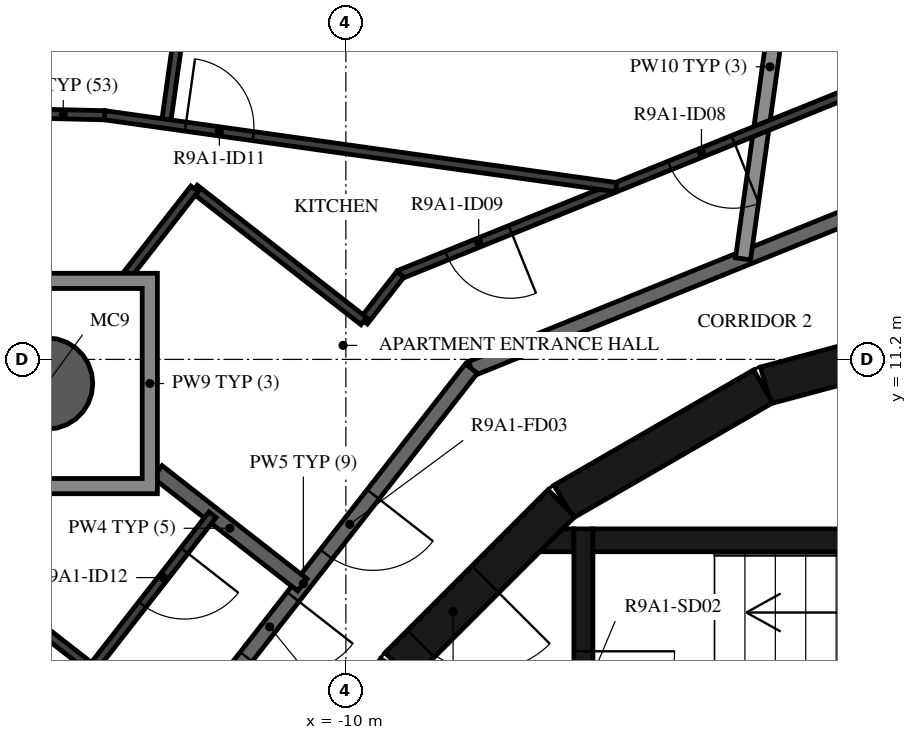
"""IFC4 building model, lengths in metres.
Left out: names, types, materials, properties, quantities, classifications, styles, units other than length and angle.
Written with IfcOpenShell. Run it as: python <this file> out.ifc"""

import sys

from ifc_helpers import new_model, si_unit, direction, frame, frame_2d, origin, origin_2d, place, context, subcontext, project, spatial, polyline, rectangle, hollow_circle, outline, extrude, element, fill, save


model = new_model("IFC4")
c1 = context("Model", 3, precision=1e-05, world=origin(), true_north=direction((0.0, 1.0)))
c2 = subcontext(c1, "Body", "Model", "MODEL_VIEW")
j1 = project(units=[si_unit("LENGTHUNIT", "METRE"), si_unit("PLANEANGLEUNIT", "RADIAN")], contexts=[c1])
p1 = place(None, origin())
s1 = spatial("IfcSite", under=j1, at=p1, CompositionType="ELEMENT")
p2 = place(p1, origin())
s2 = spatial("IfcBuilding", under=s1, at=p2, CompositionType="ELEMENT")
p3 = place(p2, frame((0.0, 0.0, 336.5)))
s3 = spatial("IfcBuildingStorey", under=s2, at=p3, CompositionType="ELEMENT", Elevation=336.5)
p4 = place(p3, frame((-13.929, 10.883, -0.38), z_axis=(0.0, 0.0, 1.0), x_axis=(1.0, 0.0, 0.0)))
e1 = element("IfcColumn", 1, at=p4, inside=s3, PredefinedType="COLUMN", context=c2, shape_type="SweptSolid", body=[
    extrude(hollow_circle(Radius=0.6, WallThickness=0.03, at=origin_2d()), origin(), (0.0, 0.0, 1.0), 3.5),
])
for number, where, z_axis, x_axis in (
    (2, (-1.55, 11.643, 0.0), (0.0, 0.0, 1.0), (-0.966, -0.259, 0.0)),
    (3, (-4.51, 10.845, 0.0), (0.0, 0.0, 1.0), (-0.866, -0.5, 0.0)),
):
    element("IfcWall", number, at=place(p3, frame(where, z_axis=z_axis, x_axis=x_axis)), inside=s3, PredefinedType="SHEAR", context=c2, shape_type="SweptSolid", body=[
        extrude(rectangle(XDim=3.033, YDim=0.5, at=frame_2d((1.516, 0.0))), origin(), (0.0, 0.0, 1.0), 3.12),
    ])
p5 = place(p3, frame((-7.164, 9.308, 0.0), z_axis=(0.0, 0.0, 1.0), x_axis=(-0.707106781187, -0.707106781187, 0.0)))
e4 = element("IfcWall", 4, at=p5, inside=s3, PredefinedType="SHEAR", context=c2, shape_type="SweptSolid", body=[
    extrude(rectangle(XDim=3.032, YDim=0.5, at=frame_2d((1.516, 0.0))), origin(), (0.0, 0.0, 1.0), 3.12),
])
p6 = place(p5, frame((1.416, 0.0, 0.0)))
e5 = element("IfcOpeningElement", 5, at=p6, cuts=e4, PredefinedType="OPENING", context=c2, shape_type="SweptSolid", body=[
    extrude(rectangle(XDim=1.2, YDim=2.1, at=frame_2d((0.6, 1.05))), frame((0.0, 0.26, 0.0), z_axis=(0.0, -1.0, 0.0), x_axis=(1.0, 0.0, 0.0)), (0.0, 0.0, 1.0), 0.52),
])
p7 = place(p3, frame((-9.329, 7.137, 0.0), z_axis=(0.0, 0.0, 1.0), x_axis=(-0.500087131594, -0.865975092491, 0.0)))
e6 = element("IfcWall", 6, at=p7, inside=s3, PredefinedType="SHEAR", context=c2, shape_type="SweptSolid", body=[
    extrude(rectangle(XDim=3.033, YDim=0.5, at=frame_2d((1.516, 0.0))), origin(), (0.0, 0.0, 1.0), 3.12),
])
p8 = place(p3, frame((-6.75, 8.82, 0.0), z_axis=(0.0, 0.0, 1.0), x_axis=(1.0, 0.0, 0.0)))
e7 = element("IfcWall", 7, at=p8, inside=s3, PredefinedType="SHEAR", context=c2, shape_type="SweptSolid", body=[
    extrude(rectangle(XDim=6.75, YDim=0.3, at=frame_2d((3.375, 0.0))), origin(), (0.0, 0.0, 1.0), 3.12),
])
p9 = place(p3, frame((-6.875, 8.97, 0.0), z_axis=(0.0, 0.0, 1.0), x_axis=(0.0, -1.0, 0.0)))
e8 = element("IfcWall", 8, at=p9, inside=s3, PredefinedType="SHEAR", context=c2, shape_type="SweptSolid", body=[
    extrude(rectangle(XDim=3.92, YDim=0.25, at=frame_2d((1.96, 0.0))), origin(), (0.0, 0.0, 1.0), 3.12),
])
p10 = place(p9, frame((1.61, 0.0, 0.0)))
e9 = element("IfcOpeningElement", 9, at=p10, cuts=e8, PredefinedType="OPENING", context=c2, shape_type="SweptSolid", body=[
    extrude(rectangle(XDim=1.2, YDim=2.1, at=frame_2d((0.6, 1.05))), frame((0.0, 0.135, 0.0), z_axis=(0.0, -1.0, 0.0), x_axis=(1.0, 0.0, 0.0)), (0.0, 0.0, 1.0), 0.27),
])
p11 = place(p3, origin())
e10 = element("IfcWall", 10, at=p11, inside=s3, PredefinedType="SHEAR", context=c2, shape_type="SweptSolid", body=[
    extrude(outline(polyline([(-7.148, 8.97), (-7.0, 8.97), (-7.0, 8.67), (-7.448, 8.67), (-7.148, 8.97)])), origin(), (0.0, 0.0, 1.0), 3.12),
])
p12 = place(p3, frame((-1.691, 13.769, 0.0), z_axis=(0.0, 0.0, 1.0), x_axis=(-0.92717916932, -0.374618189599, 0.0)))
e11 = element("IfcWall", 11, at=p12, inside=s3, PredefinedType="STANDARD", context=c2, shape_type="SweptSolid", body=[
    extrude(rectangle(XDim=7.181, YDim=0.2, at=frame_2d((3.591, 0.0))), origin(), (0.0, 0.0, 1.0), 3.12),
])
p13 = place(p3, frame((-8.349, 11.079, 0.0), z_axis=(0.0, 0.0, 1.0), x_axis=(-0.615669112324, -0.78800478687, 0.0)))
e12 = element("IfcWall", 12, at=p13, inside=s3, PredefinedType="STANDARD", context=c2, shape_type="SweptSolid", body=[
    extrude(rectangle(XDim=7.181, YDim=0.2, at=frame_2d((3.591, 0.0))), origin(), (0.0, 0.0, 1.0), 3.12),
])
p14 = place(p13, frame((2.1, 0.0, 0.0)))
e13 = element("IfcOpeningElement", 13, at=p14, cuts=e12, PredefinedType="OPENING", context=c2, shape_type="SweptSolid", body=[
    extrude(rectangle(XDim=1.0, YDim=2.1, at=frame_2d((0.5, 1.05))), frame((0.0, 0.11, 0.0), z_axis=(0.0, -1.0, 0.0), x_axis=(1.0, 0.0, 0.0)), (0.0, 0.0, 1.0), 0.22),
])
p15 = place(p13, frame((3.811, 0.0, 0.0)))
e14 = element("IfcOpeningElement", 14, at=p15, cuts=e12, PredefinedType="OPENING", context=c2, shape_type="SweptSolid", body=[
    extrude(rectangle(XDim=1.0, YDim=2.1, at=frame_2d((0.5, 1.05))), frame((0.0, 0.11, 0.0), z_axis=(0.0, -1.0, 0.0), x_axis=(1.0, 0.0, 0.0)), (0.0, 0.0, 1.0), 0.22),
])
p16 = place(p3, frame((-4.065, 17.575, 0.0), z_axis=(0.0, 0.0, 1.0), x_axis=(-0.139163175955, -0.990269463559, 0.0)))
e15 = element("IfcWall", 15, at=p16, inside=s3, PredefinedType="STANDARD", context=c2, shape_type="SweptSolid", body=[
    extrude(rectangle(XDim=5.102, YDim=0.2, at=frame_2d((2.551, 0.0))), origin(), (0.0, 0.0, 1.0), 2.73),
])
p17 = place(p3, frame((-12.479, 9.723, 0.0), z_axis=(0.0, 0.0, 1.0), x_axis=(0.788030490991, -0.615636211792, 0.0)))
e16 = element("IfcWall", 16, at=p17, inside=s3, PredefinedType="STANDARD", context=c2, shape_type="SweptSolid", body=[
    extrude(rectangle(XDim=2.42, YDim=0.2, at=frame_2d((1.21, 0.0))), origin(), (0.0, 0.0, 1.0), 3.12),
])
p18 = place(p3, frame((-1.88, 15.311, 0.0), z_axis=(0.0, 0.0, 1.0), x_axis=(-0.927184866592, -0.374604088557, 0.0)))
e17 = element("IfcWall", 17, at=p18, inside=s3, PredefinedType="PARTITIONING", context=c2, shape_type="SweptSolid", body=[
    extrude(rectangle(XDim=7.985, YDim=0.12, at=frame_2d((3.993, 0.0))), origin(), (0.0, 0.0, 1.0), 3.12),
])
p19 = place(p18, frame((3.262, 0.0, 0.0)))
e18 = element("IfcOpeningElement", 18, at=p19, cuts=e17, PredefinedType="OPENING", context=c2, shape_type="SweptSolid", body=[
    extrude(rectangle(XDim=0.9, YDim=2.1, at=frame_2d((0.45, 1.05))), frame((0.0, 0.07, 0.0), z_axis=(0.0, -1.0, 0.0), x_axis=(1.0, 0.0, 0.0)), (0.0, 0.0, 1.0), 0.14),
])
p20 = place(p18, frame((6.423, 0.0, 0.0)))
e19 = element("IfcOpeningElement", 19, at=p20, cuts=e17, PredefinedType="OPENING", context=c2, shape_type="SweptSolid", body=[
    extrude(rectangle(XDim=0.9, YDim=2.1, at=frame_2d((0.45, 1.05))), frame((0.0, 0.07, 0.0), z_axis=(0.0, -1.0, 0.0), x_axis=(1.0, 0.0, 0.0)), (0.0, 0.0, 1.0), 0.14),
])
p21 = place(p3, frame((-9.283, 12.319, 0.0), z_axis=(0.0, 0.0, 1.0), x_axis=(-0.615735018346, -0.787953289975, 0.0)))
e20 = element("IfcWall", 20, at=p21, inside=s3, PredefinedType="PARTITIONING", context=c2, shape_type="SweptSolid", body=[
    extrude(rectangle(XDim=0.781, YDim=0.12, at=frame_2d((0.391, 0.0))), origin(), (0.0, 0.0, 1.0), 3.12),
])
p22 = place(p3, frame((-9.764, 11.704, 0.0), z_axis=(0.0, 0.0, 1.0), x_axis=(-0.787996873396, 0.615679240772, 0.0)))
e21 = element("IfcWall", 21, at=p22, inside=s3, PredefinedType="PARTITIONING", context=c2, shape_type="SweptSolid", body=[
    extrude(rectangle(XDim=2.826, YDim=0.12, at=frame_2d((1.413, 0.0))), origin(), (0.0, 0.0, 1.0), 3.12),
])
p23 = place(p3, frame((-11.992, 13.444, 0.0), z_axis=(0.0, 0.0, 1.0), x_axis=(-0.615593635541, -0.788063751153, 0.0)))
e22 = element("IfcWall", 22, at=p23, inside=s3, PredefinedType="PARTITIONING", context=c2, shape_type="SweptSolid", body=[
    extrude(rectangle(XDim=1.41, YDim=0.12, at=frame_2d((0.705, 0.0))), origin(), (0.0, 0.0, 1.0), 3.12),
])
p24 = place(p3, frame((-11.755, 18.656, 0.0), z_axis=(0.0, 0.0, 1.0), x_axis=(-0.13916046232, -0.990269844904, 0.0)))
e23 = element("IfcWall", 23, at=p24, inside=s3, PredefinedType="PARTITIONING", context=c2, shape_type="SweptSolid", body=[
    extrude(rectangle(XDim=4.4, YDim=0.12, at=frame_2d((2.2, 0.0))), origin(), (0.0, 0.0, 1.0), 2.73),
])
p25 = place(p24, frame((0.2, 0.0, 0.0)))
e24 = element("IfcOpeningElement", 24, at=p25, cuts=e23, PredefinedType="OPENING", context=c2, shape_type="SweptSolid", body=[
    extrude(rectangle(XDim=0.9, YDim=2.1, at=frame_2d((0.45, 1.05))), frame((0.0, 0.07, 0.0), z_axis=(0.0, -1.0, 0.0), x_axis=(1.0, 0.0, 0.0)), (0.0, 0.0, 1.0), 0.14),
])
p26 = place(p3, frame((-13.175, 14.412, 0.0), z_axis=(0.0, 0.0, 1.0), x_axis=(0.990264549393, -0.139198140128, 0.0)))
e25 = element("IfcWall", 25, at=p26, inside=s3, PredefinedType="PARTITIONING", context=c2, shape_type="SweptSolid", body=[
    extrude(rectangle(XDim=6.796, YDim=0.12, at=frame_2d((3.398, 0.0))), origin(), (0.0, 0.0, 1.0), 3.12),
])
p27 = place(p26, frame((1.075, 0.0, 0.0)))
e26 = element("IfcOpeningElement", 26, at=p27, cuts=e25, PredefinedType="OPENING", context=c2, shape_type="SweptSolid", body=[
    extrude(rectangle(XDim=0.9, YDim=2.1, at=frame_2d((0.45, 1.05))), frame((0.0, 0.07, 0.0), z_axis=(0.0, -1.0, 0.0), x_axis=(1.0, 0.0, 0.0)), (0.0, 0.0, 1.0), 0.14),
])
p28 = place(p3, frame((-14.261, 14.438, 0.0), z_axis=(0.0, 0.0, 1.0), x_axis=(0.999732237365, -0.023139869764, 0.0)))
e27 = element("IfcWall", 27, at=p28, inside=s3, PredefinedType="PARTITIONING", context=c2, shape_type="SweptSolid", body=[
    extrude(rectangle(XDim=1.087, YDim=0.12, at=frame_2d((0.543, 0.0))), origin(), (0.0, 0.0, 1.0), 3.12),
])
p29 = place(p3, frame((-11.754, 9.157, 0.0), z_axis=(0.0, 0.0, 1.0), x_axis=(-0.615568539365, -0.788083354312, 0.0)))
e28 = element("IfcWall", 28, at=p29, inside=s3, PredefinedType="PARTITIONING", context=c2, shape_type="SweptSolid", body=[
    extrude(rectangle(XDim=2.573, YDim=0.12, at=frame_2d((1.286, 0.0))), origin(), (0.0, 0.0, 1.0), 3.12),
])
p30 = place(p29, frame((0.6, 0.0, 0.0)))
e29 = element("IfcOpeningElement", 29, at=p30, cuts=e28, PredefinedType="OPENING", context=c2, shape_type="SweptSolid", body=[
    extrude(rectangle(XDim=0.9, YDim=2.1, at=frame_2d((0.45, 1.05))), frame((0.0, 0.07, 0.0), z_axis=(0.0, -1.0, 0.0), x_axis=(1.0, 0.0, 0.0)), (0.0, 0.0, 1.0), 0.14),
])
p31 = place(p3, frame((-13.338, 7.129, 0.0), z_axis=(0.0, 0.0, 1.0), x_axis=(-0.787938483233, 0.615753965997, 0.0)))
e30 = element("IfcWall", 30, at=p31, inside=s3, PredefinedType="PARTITIONING", context=c2, shape_type="SweptSolid", body=[
    extrude(rectangle(XDim=1.853, YDim=0.12, at=frame_2d((0.927, 0.0))), origin(), (0.0, 0.0, 1.0), 3.12),
])
p32 = place(p3, origin())
e31 = element("IfcWall", 31, at=p32, inside=s3, PredefinedType="STANDARD", context=c2, shape_type="SweptSolid", body=[
    extrude(outline(polyline([(-12.479, 12.333), (-12.479, 9.433), (-15.379, 9.433), (-15.379, 12.333), (-12.479, 12.333)]), holes=[polyline([(-15.179, 9.633), (-12.679, 9.633), (-12.679, 12.133), (-15.179, 12.133), (-15.179, 9.633)])]), origin(), (0.0, 0.0, 1.0), 3.12),
])
p33 = place(p10, origin())
e32 = element("IfcDoor", 32, at=p33, inside=s3, OperationType="SINGLE_SWING_LEFT", PredefinedType="DOOR", context=c2, shape_type="SweptSolid", body=[
    extrude(rectangle(XDim=1.2, YDim=2.1, at=frame_2d((0.6, 1.05))), frame((0.0, 0.025, 0.0), z_axis=(0.0, -1.0, 0.0), x_axis=(1.0, 0.0, 0.0)), (0.0, 0.0, 1.0), 0.05),
])
fill(e9, e32)
p34 = place(p6, origin())
e33 = element("IfcDoor", 33, at=p34, inside=s3, OperationType="SINGLE_SWING_RIGHT", PredefinedType="DOOR", context=c2, shape_type="SweptSolid", body=[
    extrude(rectangle(XDim=1.2, YDim=2.1, at=frame_2d((0.6, 1.05))), frame((0.0, 0.025, 0.0), z_axis=(0.0, -1.0, 0.0), x_axis=(1.0, 0.0, 0.0)), (0.0, 0.0, 1.0), 0.05),
])
fill(e5, e33)
p35 = place(p14, origin())
e34 = element("IfcDoor", 34, at=p35, inside=s3, OperationType="SINGLE_SWING_RIGHT", PredefinedType="DOOR", context=c2, shape_type="SweptSolid", body=[
    extrude(rectangle(XDim=1.0, YDim=2.1, at=frame_2d((0.5, 1.05))), frame((0.0, 0.025, 0.0), z_axis=(0.0, -1.0, 0.0), x_axis=(1.0, 0.0, 0.0)), (0.0, 0.0, 1.0), 0.05),
])
fill(e13, e34)
p36 = place(p19, origin())
e35 = element("IfcDoor", 35, at=p36, inside=s3, OperationType="SINGLE_SWING_RIGHT", PredefinedType="DOOR", context=c2, shape_type="SweptSolid", body=[
    extrude(rectangle(XDim=0.9, YDim=2.1, at=frame_2d((0.45, 1.05))), frame((0.0, 0.025, 0.0), z_axis=(0.0, -1.0, 0.0), x_axis=(1.0, 0.0, 0.0)), (0.0, 0.0, 1.0), 0.05),
])
fill(e18, e35)
p37 = place(p20, origin())
e36 = element("IfcDoor", 36, at=p37, inside=s3, OperationType="SINGLE_SWING_RIGHT", PredefinedType="DOOR", context=c2, shape_type="SweptSolid", body=[
    extrude(rectangle(XDim=0.9, YDim=2.1, at=frame_2d((0.45, 1.05))), frame((0.0, 0.025, 0.0), z_axis=(0.0, -1.0, 0.0), x_axis=(1.0, 0.0, 0.0)), (0.0, 0.0, 1.0), 0.05),
])
fill(e19, e36)
p38 = place(p27, origin())
e37 = element("IfcDoor", 37, at=p38, inside=s3, OperationType="SINGLE_SWING_LEFT", PredefinedType="DOOR", context=c2, shape_type="SweptSolid", body=[
    extrude(rectangle(XDim=0.9, YDim=2.1, at=frame_2d((0.45, 1.05))), frame((0.0, 0.025, 0.0), z_axis=(0.0, -1.0, 0.0), x_axis=(1.0, 0.0, 0.0)), (0.0, 0.0, 1.0), 0.05),
])
fill(e26, e37)
p39 = place(p15, origin())
e38 = element("IfcDoor", 38, at=p39, inside=s3, OperationType="SINGLE_SWING_LEFT", PredefinedType="DOOR", context=c2, shape_type="SweptSolid", body=[
    extrude(rectangle(XDim=1.0, YDim=2.1, at=frame_2d((0.5, 1.05))), frame((0.0, 0.025, 0.0), z_axis=(0.0, -1.0, 0.0), x_axis=(1.0, 0.0, 0.0)), (0.0, 0.0, 1.0), 0.05),
])
fill(e14, e38)
p40 = place(p30, origin())
e39 = element("IfcDoor", 39, at=p40, inside=s3, OperationType="SINGLE_SWING_LEFT", PredefinedType="DOOR", context=c2, shape_type="SweptSolid", body=[
    extrude(rectangle(XDim=0.9, YDim=2.1, at=frame_2d((0.45, 1.05))), frame((0.0, 0.025, 0.0), z_axis=(0.0, -1.0, 0.0), x_axis=(1.0, 0.0, 0.0)), (0.0, 0.0, 1.0), 0.05),
])
fill(e29, e39)
save(model, sys.argv[1])
